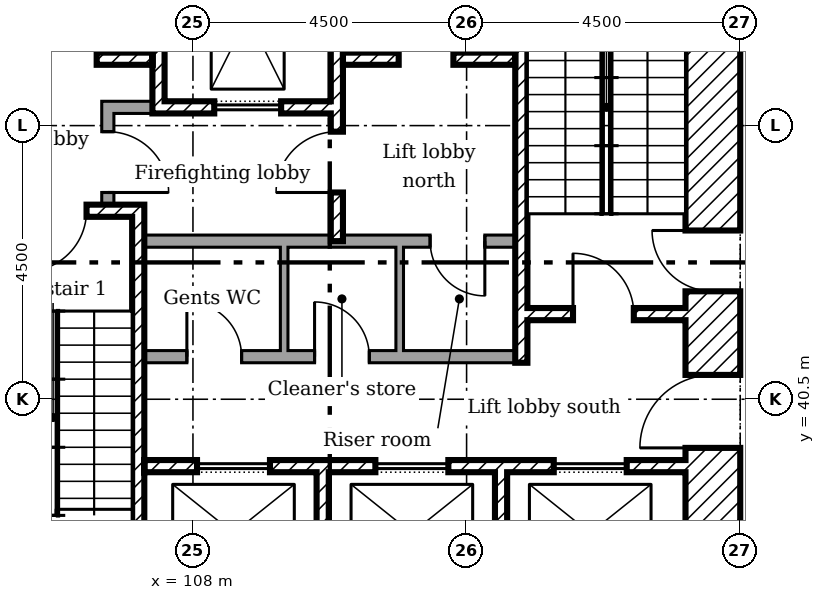
"""IFC4 building model, lengths in metres.
Left out: names, types, materials, properties, quantities, classifications, styles, units other than length and angle.
Written with IfcOpenShell. Run it as: python <this file> out.ifc"""

import sys

from ifc_helpers import new_model, si_unit, direction, frame, frame_2d, origin, place, context, subcontext, project, spatial, rectangle, extrude, element, fill, save


model = new_model("IFC4")
c1 = context("Model", 3, precision=1e-05, world=origin(), true_north=direction((0.0, 1.0)))
c2 = subcontext(c1, "Body", "Model", "MODEL_VIEW")
j1 = project(units=[si_unit("LENGTHUNIT", "METRE"), si_unit("PLANEANGLEUNIT", "RADIAN")], contexts=[c1])
p1 = place(None, origin())
s1 = spatial("IfcSite", under=j1, at=p1, CompositionType="ELEMENT")
p2 = place(p1, origin())
s2 = spatial("IfcBuilding", under=s1, at=p2, CompositionType="ELEMENT")
p3 = place(p2, frame((0.0, 0.0, 29.8)))
s3 = spatial("IfcBuildingStorey", under=s2, at=p3, CompositionType="ELEMENT", Elevation=29.8)
p4 = place(p3, frame((116.55, 36.0, 0.0), z_axis=(0.0, 0.0, 1.0), x_axis=(0.0, 1.0, 0.0)))
e1 = element("IfcWall", 1, at=p4, inside=s3, PredefinedType="SHEAR", context=c2, shape_type="SweptSolid", body=[
    extrude(rectangle(XDim=13.5, YDim=0.9, at=frame_2d((6.75, 0.0))), origin(), (0.0, 0.0, 1.0), 4.125),
])
p5 = place(p4, frame((3.7, 0.0, 0.0)))
e2 = element("IfcOpeningElement", 2, at=p5, cuts=e1, PredefinedType="OPENING", context=c2, shape_type="SweptSolid", body=[
    extrude(rectangle(XDim=1.2, YDim=2.1, at=frame_2d((0.6, 1.05))), frame((0.0, 0.46, 0.0), z_axis=(0.0, -1.0, 0.0), x_axis=(1.0, 0.0, 0.0)), (0.0, 0.0, 1.0), 0.92),
])
p6 = place(p4, frame((6.275, 0.0, 0.0)))
e3 = element("IfcOpeningElement", 3, at=p6, cuts=e1, PredefinedType="OPENING", context=c2, shape_type="SweptSolid", body=[
    extrude(rectangle(XDim=1.0, YDim=2.1, at=frame_2d((0.5, 1.05))), frame((0.0, 0.46, 0.0), z_axis=(0.0, -1.0, 0.0), x_axis=(1.0, 0.0, 0.0)), (0.0, 0.0, 1.0), 0.92),
])
p7 = place(p3, frame((107.433, 48.6, 0.0), z_axis=(0.0, 0.0, 1.0), x_axis=(0.0, -1.0, 0.0)))
e4 = element("IfcWall", 4, at=p7, inside=s3, PredefinedType="SHEAR", context=c2, shape_type="SweptSolid", body=[
    extrude(rectangle(XDim=3.4, YDim=0.2, at=frame_2d((1.7, 0.0))), origin(), (0.0, 0.0, 1.0), 4.125),
])
p8 = place(p3, frame((110.367, 48.6, 0.0), z_axis=(0.0, 0.0, 1.0), x_axis=(0.0, -1.0, 0.0)))
e5 = element("IfcWall", 5, at=p8, inside=s3, PredefinedType="SHEAR", context=c2, shape_type="SweptSolid", body=[
    extrude(rectangle(XDim=5.5, YDim=0.2, at=frame_2d((2.75, 0.0))), origin(), (0.0, 0.0, 1.0), 4.125),
])
p9 = place(p8, frame((3.7, 0.0, 0.0)))
e6 = element("IfcOpeningElement", 6, at=p9, cuts=e5, PredefinedType="OPENING", context=c2, shape_type="SweptSolid", body=[
    extrude(rectangle(XDim=1.0, YDim=2.1, at=frame_2d((0.5, 1.05))), frame((0.0, 0.11, 0.0), z_axis=(0.0, -1.0, 0.0), x_axis=(1.0, 0.0, 0.0)), (0.0, 0.0, 1.0), 0.22),
])
for number, where, z_axis, x_axis in (
    (7, (110.133, 36.9, 0.0), (0.0, 0.0, 1.0), (0.0, 1.0, 0.0)),
    (8, (113.067, 36.9, 0.0), (0.0, 0.0, 1.0), (0.0, 1.0, 0.0)),
):
    element("IfcWall", number, at=place(p3, frame(where, z_axis=z_axis, x_axis=x_axis)), inside=s3, PredefinedType="SHEAR", context=c2, shape_type="SweptSolid", body=[
        extrude(rectangle(XDim=2.4, YDim=0.2, at=frame_2d((1.2, 0.0))), origin(), (0.0, 0.0, 1.0), 4.125),
    ])
p10 = place(p3, frame((106.5, 45.3, 0.0)))
e9 = element("IfcWall", 9, at=p10, inside=s3, PredefinedType="PARTITIONING", context=c2, shape_type="SweptSolid", body=[
    extrude(rectangle(XDim=0.833, YDim=0.2, at=frame_2d((0.417, 0.0))), origin(), (0.0, 0.0, 1.0), 4.125),
])
p11 = place(p3, frame((106.6, 43.7, 0.0), z_axis=(0.0, 0.0, 1.0), x_axis=(0.0, 1.0, 0.0)))
e10 = element("IfcWall", 10, at=p11, inside=s3, PredefinedType="PARTITIONING", context=c2, shape_type="SweptSolid", body=[
    extrude(rectangle(XDim=1.5, YDim=0.2, at=frame_2d((0.75, 0.0))), origin(), (0.0, 0.0, 1.0), 4.125),
])
p12 = place(p11, frame((0.2, 0.0, 0.0)))
e11 = element("IfcOpeningElement", 11, at=p12, cuts=e10, PredefinedType="OPENING", context=c2, shape_type="SweptSolid", body=[
    extrude(rectangle(XDim=1.0, YDim=2.1, at=frame_2d((0.5, 1.05))), frame((0.0, 0.11, 0.0), z_axis=(0.0, -1.0, 0.0), x_axis=(1.0, 0.0, 0.0)), (0.0, 0.0, 1.0), 0.22),
])
p13 = place(p3, frame((104.4, 46.1, 0.0)))
e12 = element("IfcWall", 12, at=p13, inside=s3, PredefinedType="SHEAR", context=c2, shape_type="SweptSolid", body=[
    extrude(rectangle(XDim=2.933, YDim=0.2, at=frame_2d((1.467, 0.0))), origin(), (0.0, 0.0, 1.0), 4.125),
])
p14 = place(p13, frame((1.117, 0.0, 0.0)))
e13 = element("IfcOpeningElement", 13, at=p14, cuts=e12, PredefinedType="OPENING", context=c2, shape_type="SweptSolid", body=[
    extrude(rectangle(XDim=0.9, YDim=2.1, at=frame_2d((0.45, 1.05))), frame((0.0, 0.11, 0.0), z_axis=(0.0, -1.0, 0.0), x_axis=(1.0, 0.0, 0.0)), (0.0, 0.0, 1.0), 0.22),
])
p15 = place(p3, frame((110.467, 46.1, 0.0)))
e14 = element("IfcWall", 14, at=p15, inside=s3, PredefinedType="SHEAR", context=c2, shape_type="SweptSolid", body=[
    extrude(rectangle(XDim=2.833, YDim=0.2, at=frame_2d((1.417, 0.0))), origin(), (0.0, 0.0, 1.0), 4.125),
])
p16 = place(p15, frame((0.917, 0.0, 0.0)))
e15 = element("IfcOpeningElement", 15, at=p16, cuts=e14, PredefinedType="OPENING", context=c2, shape_type="SweptSolid", body=[
    extrude(rectangle(XDim=0.9, YDim=2.1, at=frame_2d((0.45, 1.05))), frame((0.0, 0.11, 0.0), z_axis=(0.0, -1.0, 0.0), x_axis=(1.0, 0.0, 0.0)), (0.0, 0.0, 1.0), 0.22),
])
p17 = place(p3, frame((107.533, 45.3, 0.0)))
e16 = element("IfcWall", 16, at=p17, inside=s3, PredefinedType="SHEAR", context=c2, shape_type="SweptSolid", body=[
    extrude(rectangle(XDim=2.733, YDim=0.2, at=frame_2d((1.367, 0.0))), origin(), (0.0, 0.0, 1.0), 4.125),
])
p18 = place(p17, frame((0.817, 0.0, 0.0)))
e17 = element("IfcOpeningElement", 17, at=p18, cuts=e16, PredefinedType="OPENING", context=c2, shape_type="SweptSolid", body=[
    extrude(rectangle(XDim=1.1, YDim=2.1, at=frame_2d((0.55, 1.05))), frame((0.0, 0.11, 0.0), z_axis=(0.0, -1.0, 0.0), x_axis=(1.0, 0.0, 0.0)), (0.0, 0.0, 1.0), 0.22),
])
p19 = place(p3, frame((107.2, 39.4, 0.0)))
e18 = element("IfcWall", 18, at=p19, inside=s3, PredefinedType="SHEAR", context=c2, shape_type="SweptSolid", body=[
    extrude(rectangle(XDim=8.9, YDim=0.2, at=frame_2d((4.45, 0.0))), origin(), (0.0, 0.0, 1.0), 4.125),
])
p20 = place(p19, frame((0.867, 0.0, 0.0)))
e19 = element("IfcOpeningElement", 19, at=p20, cuts=e18, PredefinedType="OPENING", context=c2, shape_type="SweptSolid", body=[
    extrude(rectangle(XDim=1.2, YDim=2.1, at=frame_2d((0.6, 1.05))), frame((0.0, 0.11, 0.0), z_axis=(0.0, -1.0, 0.0), x_axis=(1.0, 0.0, 0.0)), (0.0, 0.0, 1.0), 0.22),
])
p21 = place(p19, frame((3.8, 0.0, 0.0)))
e20 = element("IfcOpeningElement", 20, at=p21, cuts=e18, PredefinedType="OPENING", context=c2, shape_type="SweptSolid", body=[
    extrude(rectangle(XDim=1.2, YDim=2.1, at=frame_2d((0.6, 1.05))), frame((0.0, 0.11, 0.0), z_axis=(0.0, -1.0, 0.0), x_axis=(1.0, 0.0, 0.0)), (0.0, 0.0, 1.0), 0.22),
])
p22 = place(p19, frame((6.733, 0.0, 0.0)))
e21 = element("IfcOpeningElement", 21, at=p22, cuts=e18, PredefinedType="OPENING", context=c2, shape_type="SweptSolid", body=[
    extrude(rectangle(XDim=1.2, YDim=2.1, at=frame_2d((0.6, 1.05))), frame((0.0, 0.11, 0.0), z_axis=(0.0, -1.0, 0.0), x_axis=(1.0, 0.0, 0.0)), (0.0, 0.0, 1.0), 0.22),
])
p23 = place(p3, frame((107.1, 36.9, 0.0), z_axis=(0.0, 0.0, 1.0), x_axis=(0.0, 1.0, 0.0)))
e22 = element("IfcWall", 22, at=p23, inside=s3, PredefinedType="SHEAR", context=c2, shape_type="SweptSolid", body=[
    extrude(rectangle(XDim=6.8, YDim=0.2, at=frame_2d((3.4, 0.0))), origin(), (0.0, 0.0, 1.0), 4.125),
])
p24 = place(p3, frame((104.4, 43.6, 0.0)))
e23 = element("IfcWall", 23, at=p24, inside=s3, PredefinedType="SHEAR", context=c2, shape_type="SweptSolid", body=[
    extrude(rectangle(XDim=2.6, YDim=0.2, at=frame_2d((1.3, 0.0))), origin(), (0.0, 0.0, 1.0), 4.125),
])
p25 = place(p24, frame((0.85, 0.0, 0.0)))
e24 = element("IfcOpeningElement", 24, at=p25, cuts=e23, PredefinedType="OPENING", context=c2, shape_type="SweptSolid", body=[
    extrude(rectangle(XDim=1.0, YDim=2.1, at=frame_2d((0.5, 1.05))), frame((0.0, 0.11, 0.0), z_axis=(0.0, -1.0, 0.0), x_axis=(1.0, 0.0, 0.0)), (0.0, 0.0, 1.0), 0.22),
])
p26 = place(p3, frame((113.5, 41.9, 0.0)))
e25 = element("IfcWall", 25, at=p26, inside=s3, PredefinedType="SHEAR", context=c2, shape_type="SweptSolid", body=[
    extrude(rectangle(XDim=2.6, YDim=0.2, at=frame_2d((1.3, 0.0))), origin(), (0.0, 0.0, 1.0), 4.125),
])
p27 = place(p26, frame((0.75, 0.0, 0.0)))
e26 = element("IfcOpeningElement", 26, at=p27, cuts=e25, PredefinedType="OPENING", context=c2, shape_type="SweptSolid", body=[
    extrude(rectangle(XDim=1.0, YDim=2.1, at=frame_2d((0.5, 1.05))), frame((0.0, 0.11, 0.0), z_axis=(0.0, -1.0, 0.0), x_axis=(1.0, 0.0, 0.0)), (0.0, 0.0, 1.0), 0.22),
])
p28 = place(p3, frame((113.4, 41.1, 0.0), z_axis=(0.0, 0.0, 1.0), x_axis=(0.0, 1.0, 0.0)))
e27 = element("IfcWall", 27, at=p28, inside=s3, PredefinedType="SHEAR", context=c2, shape_type="SweptSolid", body=[
    extrude(rectangle(XDim=7.5, YDim=0.2, at=frame_2d((3.75, 0.0))), origin(), (0.0, 0.0, 1.0), 4.125),
])
p29 = place(p3, frame((107.2, 43.1, 0.0)))
e28 = element("IfcWall", 28, at=p29, inside=s3, PredefinedType="PARTITIONING", context=c2, shape_type="SweptSolid", body=[
    extrude(rectangle(XDim=6.1, YDim=0.2, at=frame_2d((3.05, 0.0))), origin(), (0.0, 0.0, 1.0), 4.125),
])
p30 = place(p29, frame((4.7, 0.0, 0.0)))
e29 = element("IfcOpeningElement", 29, at=p30, cuts=e28, PredefinedType="OPENING", context=c2, shape_type="SweptSolid", body=[
    extrude(rectangle(XDim=0.9, YDim=2.1, at=frame_2d((0.45, 1.05))), frame((0.0, 0.11, 0.0), z_axis=(0.0, -1.0, 0.0), x_axis=(1.0, 0.0, 0.0)), (0.0, 0.0, 1.0), 0.22),
])
p31 = place(p3, frame((107.2, 41.2, 0.0)))
e30 = element("IfcWall", 30, at=p31, inside=s3, PredefinedType="PARTITIONING", context=c2, shape_type="SweptSolid", body=[
    extrude(rectangle(XDim=6.1, YDim=0.2, at=frame_2d((3.05, 0.0))), origin(), (0.0, 0.0, 1.0), 4.125),
])
p32 = place(p31, frame((0.7, 0.0, 0.0)))
e31 = element("IfcOpeningElement", 31, at=p32, cuts=e30, PredefinedType="OPENING", context=c2, shape_type="SweptSolid", body=[
    extrude(rectangle(XDim=0.9, YDim=2.1, at=frame_2d((0.45, 1.05))), frame((0.0, 0.11, 0.0), z_axis=(0.0, -1.0, 0.0), x_axis=(1.0, 0.0, 0.0)), (0.0, 0.0, 1.0), 0.22),
])
p33 = place(p31, frame((2.8, 0.0, 0.0)))
e32 = element("IfcOpeningElement", 32, at=p33, cuts=e30, PredefinedType="OPENING", context=c2, shape_type="SweptSolid", body=[
    extrude(rectangle(XDim=0.9, YDim=2.1, at=frame_2d((0.45, 1.05))), frame((0.0, 0.11, 0.0), z_axis=(0.0, -1.0, 0.0), x_axis=(1.0, 0.0, 0.0)), (0.0, 0.0, 1.0), 0.22),
])
for number, where, z_axis, x_axis in (
    (33, (109.5, 41.3, 0.0), (0.0, 0.0, 1.0), (0.0, 1.0, 0.0)),
    (34, (111.4, 41.3, 0.0), (0.0, 0.0, 1.0), (0.0, 1.0, 0.0)),
):
    element("IfcWall", number, at=place(p3, frame(where, z_axis=z_axis, x_axis=x_axis)), inside=s3, PredefinedType="PARTITIONING", context=c2, shape_type="SweptSolid", body=[
        extrude(rectangle(XDim=1.7, YDim=0.125, at=frame_2d((0.85, 0.0))), origin(), (0.0, 0.0, 1.0), 4.125),
    ])
p34 = place(p5, origin())
e35 = element("IfcDoor", 35, at=p34, inside=s3, OperationType="SINGLE_SWING_RIGHT", PredefinedType="DOOR", context=c2, shape_type="SweptSolid", body=[
    extrude(rectangle(XDim=1.2, YDim=2.1, at=frame_2d((0.6, 1.05))), frame((0.0, 0.025, 0.0), z_axis=(0.0, -1.0, 0.0), x_axis=(1.0, 0.0, 0.0)), (0.0, 0.0, 1.0), 0.05),
])
fill(e2, e35)
p35 = place(p25, frame((1.0, 0.0, 0.0), x_axis=(-1.0, 0.0, 0.0)))
e36 = element("IfcDoor", 36, at=p35, inside=s3, OperationType="SINGLE_SWING_LEFT", PredefinedType="DOOR", context=c2, shape_type="SweptSolid", body=[
    extrude(rectangle(XDim=1.0, YDim=2.1, at=frame_2d((0.5, 1.05))), frame((0.0, 0.025, 0.0), z_axis=(0.0, -1.0, 0.0), x_axis=(1.0, 0.0, 0.0)), (0.0, 0.0, 1.0), 0.05),
])
fill(e24, e36)
p36 = place(p27, origin())
e37 = element("IfcDoor", 37, at=p36, inside=s3, OperationType="SINGLE_SWING_RIGHT", PredefinedType="DOOR", context=c2, shape_type="SweptSolid", body=[
    extrude(rectangle(XDim=1.0, YDim=2.1, at=frame_2d((0.5, 1.05))), frame((0.0, 0.025, 0.0), z_axis=(0.0, -1.0, 0.0), x_axis=(1.0, 0.0, 0.0)), (0.0, 0.0, 1.0), 0.05),
])
fill(e26, e37)
p37 = place(p6, origin())
e38 = element("IfcDoor", 38, at=p37, inside=s3, OperationType="SINGLE_SWING_LEFT", PredefinedType="DOOR", context=c2, shape_type="SweptSolid", body=[
    extrude(rectangle(XDim=1.0, YDim=2.1, at=frame_2d((0.5, 1.05))), frame((0.0, 0.025, 0.0), z_axis=(0.0, -1.0, 0.0), x_axis=(1.0, 0.0, 0.0)), (0.0, 0.0, 1.0), 0.05),
])
fill(e3, e38)
p38 = place(p9, frame((1.0, 0.0, 0.0), x_axis=(-1.0, 0.0, 0.0)))
e39 = element("IfcDoor", 39, at=p38, inside=s3, OperationType="SINGLE_SWING_RIGHT", PredefinedType="DOOR", context=c2, shape_type="SweptSolid", body=[
    extrude(rectangle(XDim=1.0, YDim=2.1, at=frame_2d((0.5, 1.05))), frame((0.0, 0.025, 0.0), z_axis=(0.0, -1.0, 0.0), x_axis=(1.0, 0.0, 0.0)), (0.0, 0.0, 1.0), 0.05),
])
fill(e6, e39)
p39 = place(p12, frame((1.0, 0.0, 0.0), x_axis=(-1.0, 0.0, 0.0)))
e40 = element("IfcDoor", 40, at=p39, inside=s3, OperationType="SINGLE_SWING_LEFT", PredefinedType="DOOR", context=c2, shape_type="SweptSolid", body=[
    extrude(rectangle(XDim=1.0, YDim=2.1, at=frame_2d((0.5, 1.05))), frame((0.0, 0.025, 0.0), z_axis=(0.0, -1.0, 0.0), x_axis=(1.0, 0.0, 0.0)), (0.0, 0.0, 1.0), 0.05),
])
fill(e11, e40)
p40 = place(p14, origin())
e41 = element("IfcDoor", 41, at=p40, inside=s3, OperationType="SINGLE_SWING_RIGHT", PredefinedType="DOOR", context=c2, shape_type="SweptSolid", body=[
    extrude(rectangle(XDim=0.9, YDim=2.1, at=frame_2d((0.45, 1.05))), frame((0.0, 0.025, 0.0), z_axis=(0.0, -1.0, 0.0), x_axis=(1.0, 0.0, 0.0)), (0.0, 0.0, 1.0), 0.05),
])
fill(e13, e41)
p41 = place(p16, origin())
e42 = element("IfcDoor", 42, at=p41, inside=s3, OperationType="SINGLE_SWING_RIGHT", PredefinedType="DOOR", context=c2, shape_type="SweptSolid", body=[
    extrude(rectangle(XDim=0.9, YDim=2.1, at=frame_2d((0.45, 1.05))), frame((0.0, 0.025, 0.0), z_axis=(0.0, -1.0, 0.0), x_axis=(1.0, 0.0, 0.0)), (0.0, 0.0, 1.0), 0.05),
])
fill(e15, e42)
p42 = place(p32, origin())
e43 = element("IfcDoor", 43, at=p42, inside=s3, OperationType="SINGLE_SWING_RIGHT", PredefinedType="DOOR", context=c2, shape_type="SweptSolid", body=[
    extrude(rectangle(XDim=0.9, YDim=2.1, at=frame_2d((0.45, 1.05))), frame((0.0, 0.025, 0.0), z_axis=(0.0, -1.0, 0.0), x_axis=(1.0, 0.0, 0.0)), (0.0, 0.0, 1.0), 0.05),
])
fill(e31, e43)
p43 = place(p33, origin())
e44 = element("IfcDoor", 44, at=p43, inside=s3, OperationType="SINGLE_SWING_RIGHT", PredefinedType="DOOR", context=c2, shape_type="SweptSolid", body=[
    extrude(rectangle(XDim=0.9, YDim=2.1, at=frame_2d((0.45, 1.05))), frame((0.0, 0.025, 0.0), z_axis=(0.0, -1.0, 0.0), x_axis=(1.0, 0.0, 0.0)), (0.0, 0.0, 1.0), 0.05),
])
fill(e32, e44)
p44 = place(p30, frame((0.9, 0.0, 0.0), x_axis=(-1.0, 0.0, 0.0)))
e45 = element("IfcDoor", 45, at=p44, inside=s3, OperationType="SINGLE_SWING_RIGHT", PredefinedType="DOOR", context=c2, shape_type="SweptSolid", body=[
    extrude(rectangle(XDim=0.9, YDim=2.1, at=frame_2d((0.45, 1.05))), frame((0.0, 0.025, 0.0), z_axis=(0.0, -1.0, 0.0), x_axis=(1.0, 0.0, 0.0)), (0.0, 0.0, 1.0), 0.05),
])
fill(e29, e45)
p45 = place(p18, origin())
e46 = element("IfcDoor", 46, at=p45, inside=s3, OperationType="SLIDING_TO_LEFT", PredefinedType="DOOR", context=c2, shape_type="SweptSolid", body=[
    extrude(rectangle(XDim=1.1, YDim=2.1, at=frame_2d((0.55, 1.05))), frame((0.0, 0.025, 0.0), z_axis=(0.0, -1.0, 0.0), x_axis=(1.0, 0.0, 0.0)), (0.0, 0.0, 1.0), 0.05),
])
fill(e17, e46)
p46 = place(p20, origin())
e47 = element("IfcDoor", 47, at=p46, inside=s3, OperationType="SLIDING_TO_LEFT", PredefinedType="DOOR", context=c2, shape_type="SweptSolid", body=[
    extrude(rectangle(XDim=1.2, YDim=2.1, at=frame_2d((0.6, 1.05))), frame((0.0, 0.025, 0.0), z_axis=(0.0, -1.0, 0.0), x_axis=(1.0, 0.0, 0.0)), (0.0, 0.0, 1.0), 0.05),
])
fill(e19, e47)
p47 = place(p21, origin())
e48 = element("IfcDoor", 48, at=p47, inside=s3, OperationType="SLIDING_TO_LEFT", PredefinedType="DOOR", context=c2, shape_type="SweptSolid", body=[
    extrude(rectangle(XDim=1.2, YDim=2.1, at=frame_2d((0.6, 1.05))), frame((0.0, 0.025, 0.0), z_axis=(0.0, -1.0, 0.0), x_axis=(1.0, 0.0, 0.0)), (0.0, 0.0, 1.0), 0.05),
])
fill(e20, e48)
p48 = place(p22, origin())
e49 = element("IfcDoor", 49, at=p48, inside=s3, OperationType="SLIDING_TO_LEFT", PredefinedType="DOOR", context=c2, shape_type="SweptSolid", body=[
    extrude(rectangle(XDim=1.2, YDim=2.1, at=frame_2d((0.6, 1.05))), frame((0.0, 0.025, 0.0), z_axis=(0.0, -1.0, 0.0), x_axis=(1.0, 0.0, 0.0)), (0.0, 0.0, 1.0), 0.05),
])
fill(e21, e49)
save(model, sys.argv[1])
